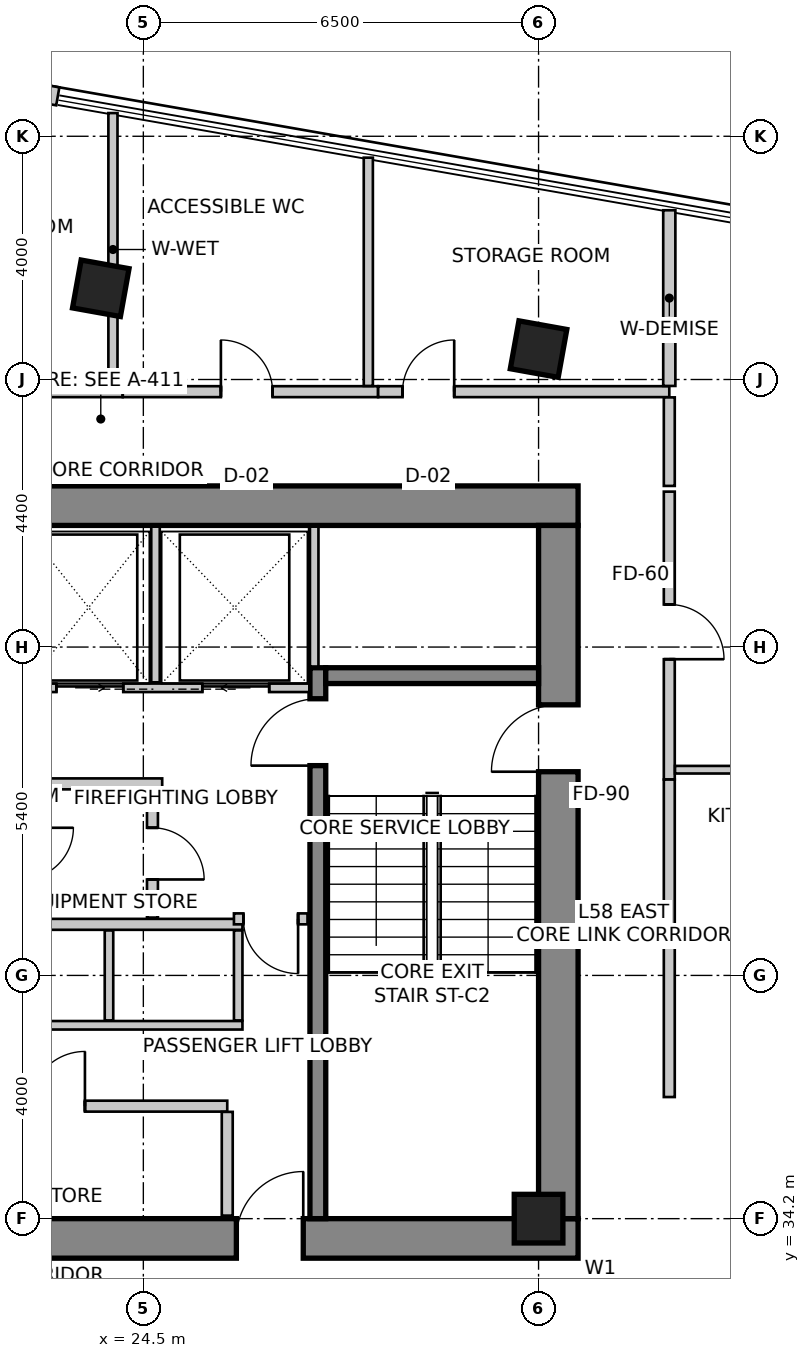
"""IFC4 building model, lengths in metres.
Left out: names, types, materials, properties, quantities, classifications, styles, units other than length and angle.
Written with IfcOpenShell. Run it as: python <this file> out.ifc"""

import sys

from ifc_helpers import new_model, si_unit, direction, frame, frame_2d, origin, origin_2d, place, context, subcontext, project, spatial, rectangle, extrude, source, transform, mapped, element, fill, save


model = new_model("IFC4")
c1 = context("Model", 3, precision=1e-05, world=origin(), true_north=direction((0.0, 1.0)))
c2 = subcontext(c1, "Body", "Model", "MODEL_VIEW")
j1 = project(units=[si_unit("LENGTHUNIT", "METRE"), si_unit("PLANEANGLEUNIT", "RADIAN")], contexts=[c1])
p1 = place(None, origin())
s1 = spatial("IfcSite", under=j1, at=p1, CompositionType="ELEMENT")
p2 = place(p1, origin())
s2 = spatial("IfcBuilding", under=s1, at=p2, CompositionType="ELEMENT")
p3 = place(p2, frame((0.0, 0.0, 228.9)))
s3 = spatial("IfcBuildingStorey", under=s2, at=p3, CompositionType="ELEMENT", Elevation=228.9)
p4 = place(p3, frame((15.95, 45.925, 0.0), z_axis=(0.0, 0.0, 1.0), x_axis=(1.0, 0.0, 0.0)))
e1 = element("IfcWall", 1, at=p4, inside=s3, PredefinedType="SHEAR", context=c2, shape_type="SweptSolid", body=[
    extrude(rectangle(XDim=15.7, YDim=0.65, at=frame_2d((7.85, 0.0))), origin(), (0.0, 0.0, 1.0), 3.5),
])
p5 = place(p3, frame((15.95, 33.875, 0.0), z_axis=(0.0, 0.0, 1.0), x_axis=(1.0, 0.0, 0.0)))
e2 = element("IfcWall", 2, at=p5, inside=s3, PredefinedType="SHEAR", context=c2, shape_type="SweptSolid", body=[
    extrude(rectangle(XDim=15.7, YDim=0.65, at=frame_2d((7.85, 0.0))), origin(), (0.0, 0.0, 1.0), 3.5),
])
m1 = source(origin(), c2, "Body", "SweptSolid", [
    extrude(rectangle(XDim=1.1, YDim=2.15, at=frame_2d((0.55, 1.075))), frame((0.0, 0.335, 0.0), z_axis=(0.0, -1.0, 0.0), x_axis=(1.0, 0.0, 0.0)), (0.0, 0.0, 1.0), 0.67),
])
p6 = place(p5, frame((10.08, 0.0, 0.0)))
e3 = element("IfcOpeningElement", 3, at=p6, cuts=e2, PredefinedType="OPENING", context=c2, shape_type="MappedRepresentation", body=[
    mapped(m1, transform((0.0, 0.0, 0.0), scale=1.0)),
])
p7 = place(p3, frame((31.325, 34.2, 0.0), z_axis=(0.0, 0.0, 1.0), x_axis=(0.0, 1.0, 0.0)))
e4 = element("IfcWall", 4, at=p7, inside=s3, PredefinedType="SHEAR", context=c2, shape_type="SweptSolid", body=[
    extrude(rectangle(XDim=11.4, YDim=0.65, at=frame_2d((5.7, 0.0))), origin(), (0.0, 0.0, 1.0), 3.5),
])
p8 = place(p7, frame((7.35, 0.0, 0.0)))
e5 = element("IfcOpeningElement", 5, at=p8, cuts=e4, PredefinedType="OPENING", context=c2, shape_type="MappedRepresentation", body=[
    mapped(m1, transform((0.0, 0.0, 0.0), scale=1.0)),
])
p9 = place(p3, frame((27.37, 34.2, 0.0), z_axis=(0.0, 0.0, 1.0), x_axis=(0.0, 1.0, 0.0)))
e6 = element("IfcWall", 6, at=p9, inside=s3, PredefinedType="SHEAR", context=c2, shape_type="SweptSolid", body=[
    extrude(rectangle(XDim=9.06, YDim=0.26, at=frame_2d((4.53, 0.0))), origin(), (0.0, 0.0, 1.0), 3.5),
])
m2 = source(origin(), c2, "Body", "SweptSolid", [
    extrude(rectangle(XDim=1.1, YDim=2.15, at=frame_2d((0.55, 1.075))), frame((0.0, 0.14, 0.0), z_axis=(0.0, -1.0, 0.0), x_axis=(1.0, 0.0, 0.0)), (0.0, 0.0, 1.0), 0.28),
])
p10 = place(p9, frame((7.45, 0.0, 0.0)))
e7 = element("IfcOpeningElement", 7, at=p10, cuts=e6, PredefinedType="OPENING", context=c2, shape_type="MappedRepresentation", body=[
    mapped(m2, transform((0.0, 0.0, 0.0), scale=1.0)),
])
p11 = place(p3, frame((27.5, 43.13, 0.0), z_axis=(0.0, 0.0, 1.0), x_axis=(1.0, 0.0, 0.0)))
e8 = element("IfcWall", 8, at=p11, inside=s3, PredefinedType="SHEAR", context=c2, shape_type="SweptSolid", body=[
    extrude(rectangle(XDim=3.5, YDim=0.26, at=frame_2d((1.75, 0.0))), origin(), (0.0, 0.0, 1.0), 3.5),
])
m3 = source(origin(), c2, "Body", "SweptSolid", [
    extrude(rectangle(XDim=0.8, YDim=0.8, at=origin_2d()), origin(), (0.0, 0.0, 1.0), 3.5),
])
for number, where, z_axis, x_axis in (
    (9, (23.8, 49.5, 0.0), (0.0, 0.0, 1.0), (0.984, -0.177, 0.0)),
    (10, (31.0, 48.5, 0.0), (0.0, 0.0, 1.0), (0.984, -0.177, 0.0)),
    (11, (31.0, 34.2, 0.0), (0.0, 0.0, 1.0), (1.0, 0.0, 0.0)),
):
    element("IfcColumn", number, at=place(p3, frame(where, z_axis=z_axis, x_axis=x_axis)), inside=s3, PredefinedType="COLUMN", context=c2, shape_type="MappedRepresentation", body=[
        mapped(m3, transform((0.0, 0.0, 0.0), scale=1.0)),
    ])
p12 = place(p3, frame((23.093, 52.657, 0.0), z_axis=(0.0, 0.0, 1.0), x_axis=(-0.985090351288, 0.172037785961, 0.0)))
e12 = element("IfcWall", 12, at=p12, inside=s3, PredefinedType="SOLIDWALL", context=c2, shape_type="SweptSolid", body=[
    extrude(rectangle(XDim=1.228, YDim=0.3, at=frame_2d((0.614, 0.0))), origin(), (0.0, 0.0, 1.0), 3.25),
])
p13 = place(p3, frame((20.37, 42.93, 0.0), z_axis=(0.0, 0.0, 1.0), x_axis=(1.0, 0.0, 0.0)))
e13 = element("IfcWall", 13, at=p13, inside=s3, PredefinedType="SOLIDWALL", context=c2, shape_type="SweptSolid", body=[
    extrude(rectangle(XDim=6.86, YDim=0.14, at=frame_2d((3.43, 0.0))), origin(), (0.0, 0.0, 1.0), 3.25),
])
m4 = source(origin(), c2, "Body", "SweptSolid", [
    extrude(rectangle(XDim=1.1, YDim=2.15, at=frame_2d((0.55, 1.075))), frame((0.0, 0.08, 0.0), z_axis=(0.0, -1.0, 0.0), x_axis=(1.0, 0.0, 0.0)), (0.0, 0.0, 1.0), 0.16),
])
p14 = place(p13, frame((0.5, 0.0, 0.0)))
e14 = element("IfcOpeningElement", 14, at=p14, cuts=e13, PredefinedType="OPENING", context=c2, shape_type="MappedRepresentation", body=[
    mapped(m4, transform((0.0, 0.0, 0.0), scale=1.0)),
])
p15 = place(p13, frame((2.7, 0.0, 0.0)))
e15 = element("IfcOpeningElement", 15, at=p15, cuts=e13, PredefinedType="OPENING", context=c2, shape_type="MappedRepresentation", body=[
    mapped(m4, transform((0.0, 0.0, 0.0), scale=1.0)),
])
p16 = place(p13, frame((5.1, 0.0, 0.0)))
e16 = element("IfcOpeningElement", 16, at=p16, cuts=e13, PredefinedType="OPENING", context=c2, shape_type="MappedRepresentation", body=[
    mapped(m4, transform((0.0, 0.0, 0.0), scale=1.0)),
])
p17 = place(p3, frame((27.31, 43.28, 0.0), z_axis=(0.0, 0.0, 1.0), x_axis=(0.0, 1.0, 0.0)))
e17 = element("IfcWall", 17, at=p17, inside=s3, PredefinedType="SOLIDWALL", context=c2, shape_type="SweptSolid", body=[
    extrude(rectangle(XDim=2.3, YDim=0.14, at=frame_2d((1.15, 0.0))), origin(), (0.0, 0.0, 1.0), 3.25),
])
p18 = place(p3, frame((24.7, 43.02, 0.0), z_axis=(0.0, 0.0, 1.0), x_axis=(0.0, 1.0, 0.0)))
e18 = element("IfcWall", 18, at=p18, inside=s3, PredefinedType="SOLIDWALL", context=c2, shape_type="SweptSolid", body=[
    extrude(rectangle(XDim=2.56, YDim=0.14, at=frame_2d((1.28, 0.0))), origin(), (0.0, 0.0, 1.0), 3.25),
])
p19 = place(p3, frame((20.38, 37.38, 0.0), z_axis=(0.0, 0.0, 1.0), x_axis=(1.0, 0.0, 0.0)))
e19 = element("IfcWall", 19, at=p19, inside=s3, PredefinedType="SOLIDWALL", context=c2, shape_type="SweptSolid", body=[
    extrude(rectangle(XDim=5.75, YDim=0.14, at=frame_2d((2.875, 0.0))), origin(), (0.0, 0.0, 1.0), 3.25),
])
m5 = source(origin(), c2, "Body", "SweptSolid", [
    extrude(rectangle(XDim=1.0, YDim=2.15, at=frame_2d((0.5, 1.075))), frame((0.0, 0.08, 0.0), z_axis=(0.0, -1.0, 0.0), x_axis=(1.0, 0.0, 0.0)), (0.0, 0.0, 1.0), 0.16),
])
p20 = place(p19, frame((0.19, 0.0, 0.0)))
e20 = element("IfcOpeningElement", 20, at=p20, cuts=e19, PredefinedType="OPENING", context=c2, shape_type="MappedRepresentation", body=[
    mapped(m5, transform((0.0, 0.0, 0.0), scale=1.0)),
])
p21 = place(p3, frame((20.38, 39.04, 0.0), z_axis=(0.0, 0.0, 1.0), x_axis=(1.0, 0.0, 0.0)))
e21 = element("IfcWall", 21, at=p21, inside=s3, PredefinedType="SOLIDWALL", context=c2, shape_type="SweptSolid", body=[
    extrude(rectangle(XDim=5.75, YDim=0.18, at=frame_2d((2.875, 0.0))), origin(), (0.0, 0.0, 1.0), 3.25),
])
for number, where, z_axis, x_axis in (
    (22, (26.06, 37.46, 0.0), (0.0, 0.0, 1.0), (0.0, 1.0, 0.0)),
    (23, (23.935, 37.46, 0.0), (0.0, 0.0, 1.0), (0.0, 1.0, 0.0)),
):
    element("IfcWall", number, at=place(p3, frame(where, z_axis=z_axis, x_axis=x_axis)), inside=s3, PredefinedType="SOLIDWALL", context=c2, shape_type="SweptSolid", body=[
        extrude(rectangle(XDim=1.48, YDim=0.14, at=frame_2d((0.74, 0.0))), origin(), (0.0, 0.0, 1.0), 3.25),
    ])
p22 = place(p3, frame((24.81, 41.35, 0.0), z_axis=(0.0, 0.0, 1.0), x_axis=(-1.0, 0.0, 0.0)))
e24 = element("IfcWall", 24, at=p22, inside=s3, PredefinedType="PARTITIONING", context=c2, shape_type="SweptSolid", body=[
    extrude(rectangle(XDim=2.148, YDim=0.18, at=frame_2d((1.074, 0.0))), origin(), (0.0, 0.0, 1.0), 3.25),
])
p23 = place(p3, frame((24.65, 41.256, 0.0), z_axis=(0.0, 0.0, 1.0), x_axis=(0.0, -1.0, 0.0)))
e25 = element("IfcWall", 25, at=p23, inside=s3, PredefinedType="PARTITIONING", context=c2, shape_type="SweptSolid", body=[
    extrude(rectangle(XDim=2.106, YDim=0.18, at=frame_2d((1.053, 0.0))), origin(), (0.0, 0.0, 1.0), 3.25),
])
m6 = source(origin(), c2, "Body", "SweptSolid", [
    extrude(rectangle(XDim=0.85, YDim=2.15, at=frame_2d((0.425, 1.075))), frame((0.0, 0.1, 0.0), z_axis=(0.0, -1.0, 0.0), x_axis=(1.0, 0.0, 0.0)), (0.0, 0.0, 1.0), 0.2),
])
p24 = place(p23, frame((0.628, 0.0, 0.0)))
e26 = element("IfcOpeningElement", 26, at=p24, cuts=e25, PredefinedType="OPENING", context=c2, shape_type="MappedRepresentation", body=[
    mapped(m6, transform((0.0, 0.0, 0.0), scale=1.0)),
])
p25 = place(p3, frame((27.2, 39.13, 0.0), z_axis=(0.0, 0.0, 1.0), x_axis=(-1.0, 0.0, 0.0)))
e27 = element("IfcWall", 27, at=p25, inside=s3, PredefinedType="PARTITIONING", context=c2, shape_type="SweptSolid", body=[
    extrude(rectangle(XDim=1.21, YDim=0.18, at=frame_2d((0.605, 0.0))), origin(), (0.0, 0.0, 1.0), 3.25),
])
m7 = source(origin(), c2, "Body", "SweptSolid", [
    extrude(rectangle(XDim=0.9, YDim=2.15, at=frame_2d((0.45, 1.075))), frame((0.0, 0.1, 0.0), z_axis=(0.0, -1.0, 0.0), x_axis=(1.0, 0.0, 0.0)), (0.0, 0.0, 1.0), 0.2),
])
p26 = place(p25, frame((0.155, 0.0, 0.0)))
e28 = element("IfcOpeningElement", 28, at=p26, cuts=e27, PredefinedType="OPENING", context=c2, shape_type="MappedRepresentation", body=[
    mapped(m7, transform((0.0, 0.0, 0.0), scale=1.0)),
])
p27 = place(p3, frame((20.42, 36.05, 0.0), z_axis=(0.0, 0.0, 1.0), x_axis=(1.0, 0.0, 0.0)))
e29 = element("IfcWall", 29, at=p27, inside=s3, PredefinedType="PARTITIONING", context=c2, shape_type="SweptSolid", body=[
    extrude(rectangle(XDim=5.46, YDim=0.18, at=frame_2d((2.73, 0.0))), origin(), (0.0, 0.0, 1.0), 3.25),
])
p28 = place(p27, frame((2.219, 0.0, 0.0)))
e30 = element("IfcOpeningElement", 30, at=p28, cuts=e29, PredefinedType="OPENING", context=c2, shape_type="MappedRepresentation", body=[
    mapped(m7, transform((0.0, 0.0, 0.0), scale=1.0)),
])
p29 = place(p3, frame((25.88, 35.956, 0.0), z_axis=(0.0, 0.0, 1.0), x_axis=(0.0, -1.0, 0.0)))
e31 = element("IfcWall", 31, at=p29, inside=s3, PredefinedType="PARTITIONING", context=c2, shape_type="SweptSolid", body=[
    extrude(rectangle(XDim=1.706, YDim=0.18, at=frame_2d((0.853, 0.0))), origin(), (0.0, 0.0, 1.0), 2.542),
])
p30 = place(p3, frame((14.453, 47.8, 0.0), z_axis=(0.0, 0.0, 1.0), x_axis=(1.0, 0.0, 0.0)))
e32 = element("IfcWall", 32, at=p30, inside=s3, PredefinedType="PARTITIONING", context=c2, shape_type="SweptSolid", body=[
    extrude(rectangle(XDim=9.707, YDim=0.18, at=frame_2d((4.854, 0.0))), origin(), (0.0, 0.0, 1.0), 2.919),
])
p31 = place(p30, frame((4.404, 0.0, 0.0)))
e33 = element("IfcOpeningElement", 33, at=p31, cuts=e32, PredefinedType="OPENING", context=c2, shape_type="MappedRepresentation", body=[
    mapped(m7, transform((0.0, 0.0, 0.0), scale=1.0)),
])
p32 = place(p3, frame((24.162, 47.8, 0.0), z_axis=(0.0, 0.0, 1.0), x_axis=(1.0, 0.0, 0.0)))
e34 = element("IfcWall", 34, at=p32, inside=s3, PredefinedType="PARTITIONING", context=c2, shape_type="SweptSolid", body=[
    extrude(rectangle(XDim=4.198, YDim=0.18, at=frame_2d((2.099, 0.0))), origin(), (0.0, 0.0, 1.0), 3.25),
])
p33 = place(p32, frame((1.613, 0.0, 0.0)))
e35 = element("IfcOpeningElement", 35, at=p33, cuts=e34, PredefinedType="OPENING", context=c2, shape_type="MappedRepresentation", body=[
    mapped(m6, transform((0.0, 0.0, 0.0), scale=1.0)),
])
p34 = place(p3, frame((28.362, 47.8, 0.0), z_axis=(0.0, 0.0, 1.0), x_axis=(1.0, 0.0, 0.0)))
e36 = element("IfcWall", 36, at=p34, inside=s3, PredefinedType="PARTITIONING", context=c2, shape_type="SweptSolid", body=[
    extrude(rectangle(XDim=4.788, YDim=0.18, at=frame_2d((2.394, 0.0))), origin(), (0.0, 0.0, 1.0), 2.779),
])
p35 = place(p34, frame((0.401, 0.0, 0.0)))
e37 = element("IfcOpeningElement", 37, at=p35, cuts=e36, PredefinedType="OPENING", context=c2, shape_type="MappedRepresentation", body=[
    mapped(m6, transform((0.0, 0.0, 0.0), scale=1.0)),
])
p36 = place(p3, frame((33.15, 47.706, 0.0), z_axis=(0.0, 0.0, 1.0), x_axis=(0.0, -1.0, 0.0)))
e38 = element("IfcWall", 38, at=p36, inside=s3, PredefinedType="PARTITIONING", context=c2, shape_type="SweptSolid", body=[
    extrude(rectangle(XDim=1.456, YDim=0.18, at=frame_2d((0.728, 0.0))), origin(), (0.0, 0.0, 1.0), 2.919),
])
p37 = place(p3, frame((33.15, 38.948, 0.0), z_axis=(0.0, 0.0, 1.0), x_axis=(0.0, -1.0, 0.0)))
e39 = element("IfcWall", 39, at=p37, inside=s3, PredefinedType="PARTITIONING", context=c2, shape_type="SweptSolid", body=[
    extrude(rectangle(XDim=2.748, YDim=0.18, at=frame_2d((1.374, 0.0))), origin(), (0.0, 0.0, 1.0), 3.25),
])
p38 = place(p3, frame((33.15, 46.156, 0.0), z_axis=(0.0, 0.0, 1.0), x_axis=(0.0, -1.0, 0.0)))
e40 = element("IfcWall", 40, at=p38, inside=s3, PredefinedType="PARTITIONING", context=c2, shape_type="SweptSolid", body=[
    extrude(rectangle(XDim=4.733, YDim=0.18, at=frame_2d((2.366, 0.0))), origin(), (0.0, 0.0, 1.0), 2.779),
])
p39 = place(p38, frame((1.856, 0.0, 0.0)))
e41 = element("IfcOpeningElement", 41, at=p39, cuts=e40, PredefinedType="OPENING", context=c2, shape_type="MappedRepresentation", body=[
    mapped(m7, transform((0.0, 0.0, 0.0), scale=1.0)),
])
p40 = place(p3, frame((33.15, 41.421, 0.0), z_axis=(0.0, 0.0, 1.0), x_axis=(0.0, -1.0, 0.0)))
e42 = element("IfcWall", 42, at=p40, inside=s3, PredefinedType="PARTITIONING", context=c2, shape_type="SweptSolid", body=[
    extrude(rectangle(XDim=2.471, YDim=0.18, at=frame_2d((1.235, 0.0))), origin(), (0.0, 0.0, 1.0), 3.25),
])
p41 = place(p3, frame((24.0, 52.382, 0.0), z_axis=(0.0, 0.0, 1.0), x_axis=(0.0, -1.0, 0.0)))
e43 = element("IfcWall", 43, at=p41, inside=s3, PredefinedType="PARTITIONING", context=c2, shape_type="SweptSolid", body=[
    extrude(rectangle(XDim=4.488, YDim=0.15, at=frame_2d((2.244, 0.0))), origin(), (0.0, 0.0, 1.0), 2.542),
])
p42 = place(p3, frame((28.2, 51.648, 0.0), z_axis=(0.0, 0.0, 1.0), x_axis=(0.0, -1.0, 0.0)))
e44 = element("IfcWall", 44, at=p42, inside=s3, PredefinedType="PARTITIONING", context=c2, shape_type="SweptSolid", body=[
    extrude(rectangle(XDim=3.754, YDim=0.15, at=frame_2d((1.877, 0.0))), origin(), (0.0, 0.0, 1.0), 2.542),
])
p43 = place(p3, frame((33.15, 50.783, 0.0), z_axis=(0.0, 0.0, 1.0), x_axis=(0.0, -1.0, 0.0)))
e45 = element("IfcWall", 45, at=p43, inside=s3, PredefinedType="PARTITIONING", context=c2, shape_type="SweptSolid", body=[
    extrude(rectangle(XDim=2.889, YDim=0.2, at=frame_2d((1.445, 0.0))), origin(), (0.0, 0.0, 1.0), 2.542),
])
p44 = place(p3, frame((33.244, 38.788, 0.0), z_axis=(0.0, 0.0, 1.0), x_axis=(1.0, 0.0, 0.0)))
e46 = element("IfcWall", 46, at=p44, inside=s3, PredefinedType="PARTITIONING", context=c2, shape_type="SweptSolid", body=[
    extrude(rectangle(XDim=6.346, YDim=0.125, at=frame_2d((3.173, 0.0))), origin(), (0.0, 0.0, 1.0), 2.766),
])
m8 = source(origin(), c2, "Body", "SweptSolid", [
    extrude(rectangle(XDim=0.9, YDim=2.15, at=frame_2d((0.45, 1.075))), frame((0.0, 0.073, 0.0), z_axis=(0.0, -1.0, 0.0), x_axis=(1.0, 0.0, 0.0)), (0.0, 0.0, 1.0), 0.145),
])
p45 = place(p44, frame((2.723, 0.0, 0.0)))
e47 = element("IfcOpeningElement", 47, at=p45, cuts=e46, PredefinedType="OPENING", context=c2, shape_type="MappedRepresentation", body=[
    mapped(m8, transform((0.0, 0.0, 0.0), scale=1.0)),
])
p46 = place(p3, frame((39.59, 41.583, 0.0), z_axis=(0.0, 0.0, 1.0), x_axis=(-1.0, 0.0, 0.0)))
e48 = element("IfcWall", 48, at=p46, inside=s3, PredefinedType="PARTITIONING", context=c2, shape_type="SweptSolid", body=[
    extrude(rectangle(XDim=6.346, YDim=0.125, at=frame_2d((3.173, 0.0))), origin(), (0.0, 0.0, 1.0), 2.766),
])
m9 = source(origin(), c2, "Body", "SweptSolid", [
    extrude(rectangle(XDim=0.85, YDim=2.15, at=frame_2d((0.425, 1.075))), frame((0.0, 0.073, 0.0), z_axis=(0.0, -1.0, 0.0), x_axis=(1.0, 0.0, 0.0)), (0.0, 0.0, 1.0), 0.145),
])
p47 = place(p46, frame((2.688, 0.0, 0.0)))
e49 = element("IfcOpeningElement", 49, at=p47, cuts=e48, PredefinedType="OPENING", context=c2, shape_type="MappedRepresentation", body=[
    mapped(m9, transform((0.0, 0.0, 0.0), scale=1.0)),
])
m10 = source(origin(), c2, "Body", "SweptSolid", [
    extrude(rectangle(XDim=1.1, YDim=2.15, at=frame_2d((0.55, 1.075))), frame((0.0, 0.025, 0.0), z_axis=(0.0, -1.0, 0.0), x_axis=(1.0, 0.0, 0.0)), (0.0, 0.0, 1.0), 0.05),
])
p48 = place(p15, origin())
e50 = element("IfcDoor", 50, at=p48, inside=s3, OperationType="SLIDING_TO_RIGHT", PredefinedType="DOOR", context=c2, shape_type="MappedRepresentation", body=[
    mapped(m10, transform((0.0, 0.0, 0.0), scale=1.0)),
])
fill(e15, e50)
m11 = source(origin(), c2, "Body", "SweptSolid", [
    extrude(rectangle(XDim=1.1, YDim=2.15, at=frame_2d((0.55, 1.075))), frame((0.0, 0.025, 0.0), z_axis=(0.0, -1.0, 0.0), x_axis=(1.0, 0.0, 0.0)), (0.0, 0.0, 1.0), 0.05),
])
p49 = place(p16, origin())
e51 = element("IfcDoor", 51, at=p49, inside=s3, OperationType="SLIDING_TO_LEFT", PredefinedType="DOOR", context=c2, shape_type="MappedRepresentation", body=[
    mapped(m11, transform((0.0, 0.0, 0.0), scale=1.0)),
])
fill(e16, e51)
m12 = source(origin(), c2, "Body", "SweptSolid", [
    extrude(rectangle(XDim=1.1, YDim=2.15, at=frame_2d((0.55, 1.075))), frame((0.0, 0.025, 0.0), z_axis=(0.0, -1.0, 0.0), x_axis=(1.0, 0.0, 0.0)), (0.0, 0.0, 1.0), 0.05),
])
p50 = place(p10, origin())
e52 = element("IfcDoor", 52, at=p50, inside=s3, OperationType="SINGLE_SWING_LEFT", PredefinedType="DOOR", context=c2, shape_type="MappedRepresentation", body=[
    mapped(m12, transform((0.0, 0.0, 0.0), scale=1.0)),
])
fill(e7, e52)
p51 = place(p8, origin())
e53 = element("IfcDoor", 53, at=p51, inside=s3, OperationType="SINGLE_SWING_LEFT", PredefinedType="DOOR", context=c2, shape_type="MappedRepresentation", body=[
    mapped(m12, transform((0.0, 0.0, 0.0), scale=1.0)),
])
fill(e5, e53)
p52 = place(p6, origin())
e54 = element("IfcDoor", 54, at=p52, inside=s3, OperationType="SINGLE_SWING_RIGHT", PredefinedType="DOOR", context=c2, shape_type="MappedRepresentation", body=[
    mapped(m12, transform((0.0, 0.0, 0.0), scale=1.0)),
])
fill(e3, e54)
m13 = source(origin(), c2, "Body", "SweptSolid", [
    extrude(rectangle(XDim=0.85, YDim=2.15, at=frame_2d((0.425, 1.075))), frame((0.0, 0.025, 0.0), z_axis=(0.0, -1.0, 0.0), x_axis=(1.0, 0.0, 0.0)), (0.0, 0.0, 1.0), 0.05),
])
p53 = place(p24, origin())
e55 = element("IfcDoor", 55, at=p53, inside=s3, OperationType="SINGLE_SWING_RIGHT", PredefinedType="DOOR", context=c2, shape_type="MappedRepresentation", body=[
    mapped(m13, transform((0.0, 0.0, 0.0), scale=1.0)),
])
fill(e26, e55)
m14 = source(origin(), c2, "Body", "SweptSolid", [
    extrude(rectangle(XDim=0.9, YDim=2.15, at=frame_2d((0.45, 1.075))), frame((0.0, 0.025, 0.0), z_axis=(0.0, -1.0, 0.0), x_axis=(1.0, 0.0, 0.0)), (0.0, 0.0, 1.0), 0.05),
])
p54 = place(p26, origin())
e56 = element("IfcDoor", 56, at=p54, inside=s3, OperationType="SINGLE_SWING_LEFT", PredefinedType="DOOR", context=c2, shape_type="MappedRepresentation", body=[
    mapped(m14, transform((0.0, 0.0, 0.0), scale=1.0)),
])
fill(e28, e56)
p55 = place(p28, origin())
e57 = element("IfcDoor", 57, at=p55, inside=s3, OperationType="SINGLE_SWING_RIGHT", PredefinedType="DOOR", context=c2, shape_type="MappedRepresentation", body=[
    mapped(m14, transform((0.0, 0.0, 0.0), scale=1.0)),
])
fill(e30, e57)
m15 = source(origin(), c2, "Body", "SweptSolid", [
    extrude(rectangle(XDim=0.85, YDim=2.15, at=frame_2d((0.425, 1.075))), frame((0.0, 0.025, 0.0), z_axis=(0.0, -1.0, 0.0), x_axis=(1.0, 0.0, 0.0)), (0.0, 0.0, 1.0), 0.05),
])
p56 = place(p33, origin())
e58 = element("IfcDoor", 58, at=p56, inside=s3, OperationType="SINGLE_SWING_LEFT", PredefinedType="DOOR", context=c2, shape_type="MappedRepresentation", body=[
    mapped(m15, transform((0.0, 0.0, 0.0), scale=1.0)),
])
fill(e35, e58)
p57 = place(p35, origin())
e59 = element("IfcDoor", 59, at=p57, inside=s3, OperationType="SINGLE_SWING_RIGHT", PredefinedType="DOOR", context=c2, shape_type="MappedRepresentation", body=[
    mapped(m15, transform((0.0, 0.0, 0.0), scale=1.0)),
])
fill(e37, e59)
p58 = place(p39, origin())
e60 = element("IfcDoor", 60, at=p58, inside=s3, OperationType="SINGLE_SWING_RIGHT", PredefinedType="DOOR", context=c2, shape_type="MappedRepresentation", body=[
    mapped(m14, transform((0.0, 0.0, 0.0), scale=1.0)),
])
fill(e41, e60)
save(model, sys.argv[1])
